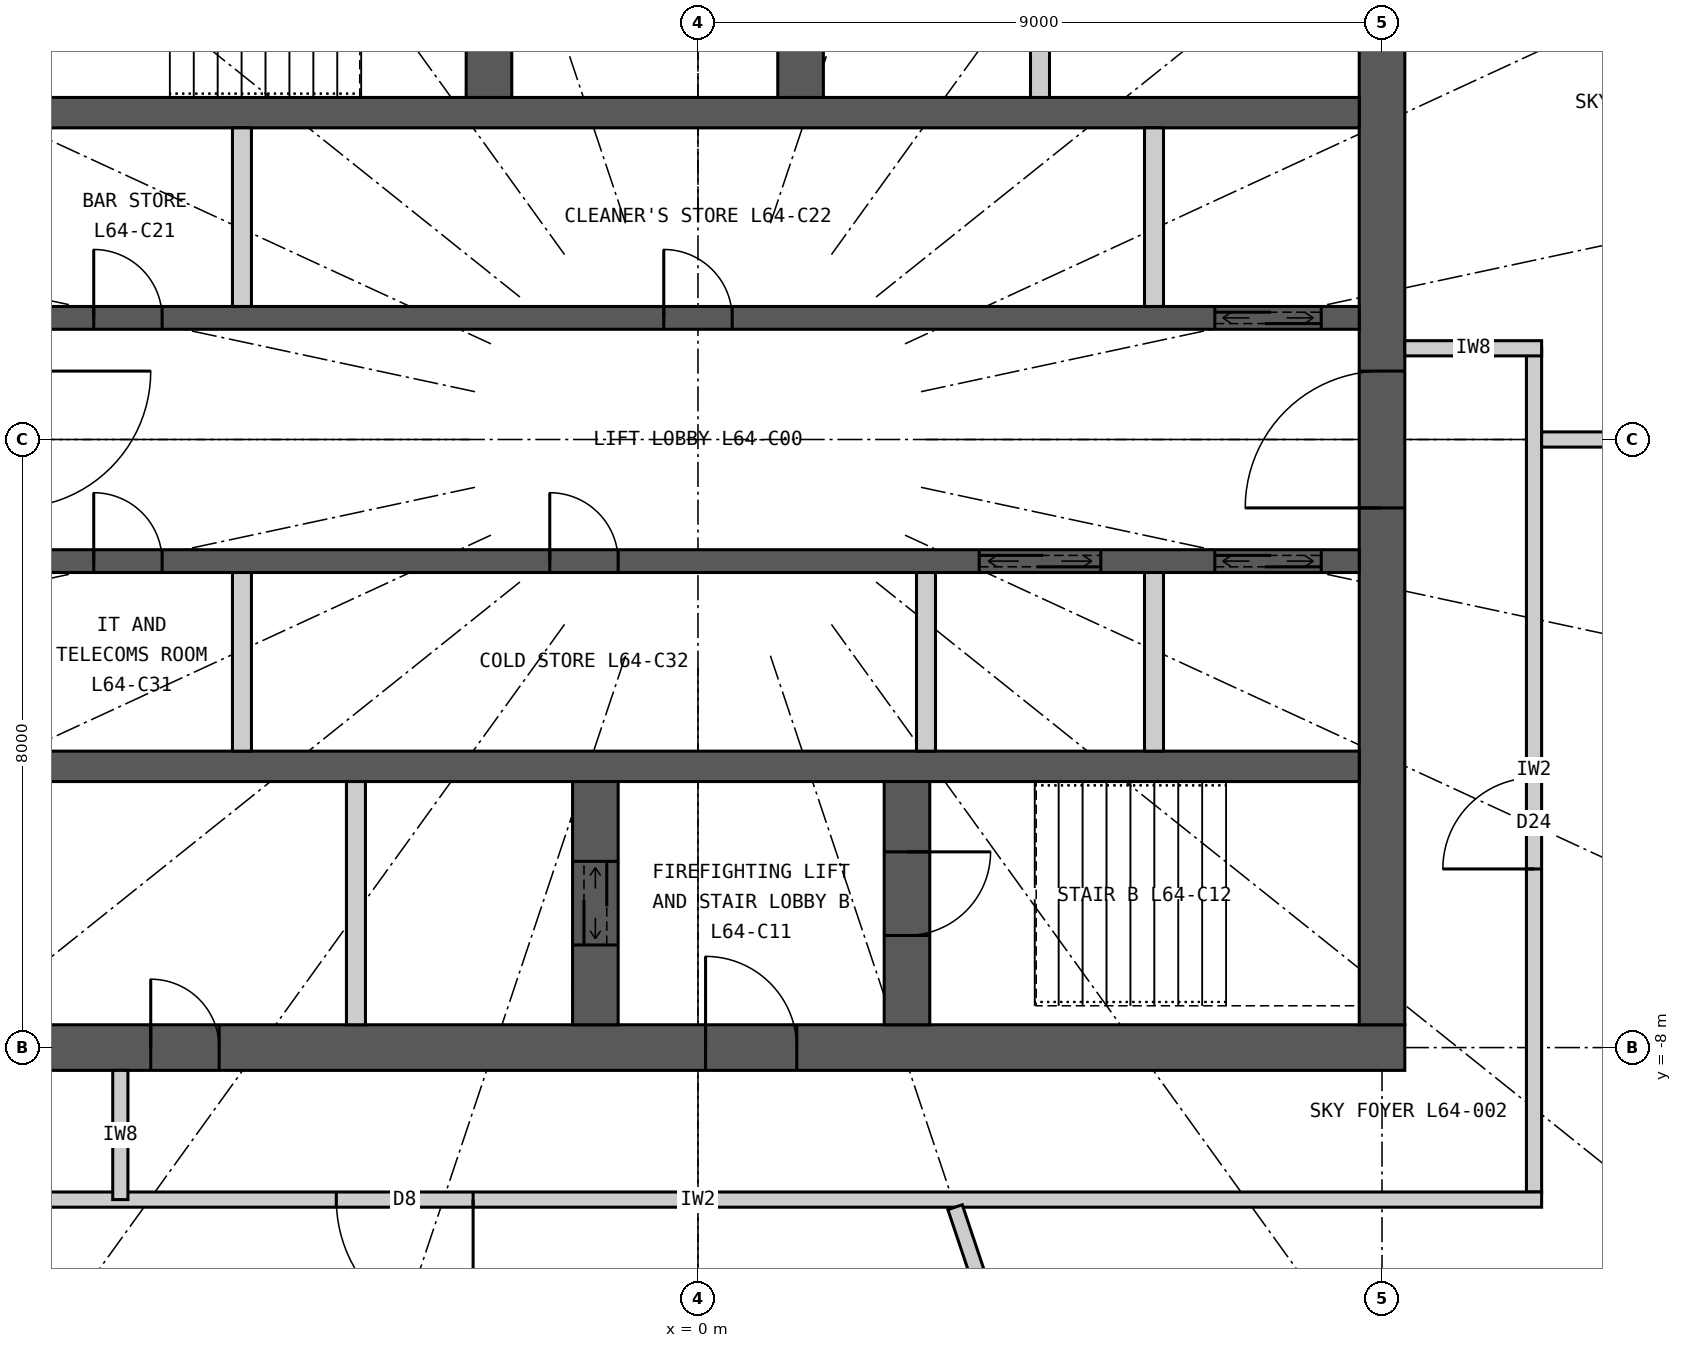
"""IFC4 building model, lengths in metres.
Left out: names, types, materials, properties, quantities, classifications, styles, units other than length and angle.
Written with IfcOpenShell. Run it as: python <this file> out.ifc"""

import sys

from ifc_helpers import new_model, si_unit, direction, frame, frame_2d, origin, place, context, subcontext, project, spatial, rectangle, extrude, element, fill, save


model = new_model("IFC4")
c1 = context("Model", 3, precision=1e-05, world=origin(), true_north=direction((0.0, 1.0)))
c2 = subcontext(c1, "Body", "Model", "MODEL_VIEW")
j1 = project(units=[si_unit("LENGTHUNIT", "METRE"), si_unit("PLANEANGLEUNIT", "RADIAN")], contexts=[c1])
p1 = place(None, origin())
s1 = spatial("IfcSite", under=j1, at=p1, CompositionType="ELEMENT")
p2 = place(p1, origin())
s2 = spatial("IfcBuilding", under=s1, at=p2, CompositionType="ELEMENT")
p3 = place(p2, frame((0.0, 0.0, 237.3)))
s3 = spatial("IfcBuildingStorey", under=s2, at=p3, CompositionType="ELEMENT", Elevation=237.3)
p4 = place(p3, frame((9.3, -8.0, 0.0), z_axis=(0.0, 0.0, 1.0), x_axis=(-1.0, 0.0, 0.0)))
e1 = element("IfcWall", 1, at=p4, inside=s3, PredefinedType="SHEAR", context=c2, shape_type="SweptSolid", body=[
    extrude(rectangle(XDim=18.6, YDim=0.6, at=frame_2d((9.3, 0.0))), origin(), (0.0, 0.0, 1.0), 5.4),
])
p5 = place(p4, frame((8.0, 0.0, 0.0)))
e2 = element("IfcOpeningElement", 2, at=p5, cuts=e1, PredefinedType="OPENING", context=c2, shape_type="SweptSolid", body=[
    extrude(rectangle(XDim=1.2, YDim=2.2, at=frame_2d((0.6, 1.1))), frame((0.0, 0.31, 0.0), z_axis=(0.0, -1.0, 0.0), x_axis=(1.0, 0.0, 0.0)), (0.0, 0.0, 1.0), 0.62),
])
p6 = place(p4, frame((15.6, 0.0, 0.0)))
e3 = element("IfcOpeningElement", 3, at=p6, cuts=e1, PredefinedType="OPENING", context=c2, shape_type="SweptSolid", body=[
    extrude(rectangle(XDim=0.9, YDim=2.2, at=frame_2d((0.45, 1.1))), frame((0.0, 0.31, 0.0), z_axis=(0.0, -1.0, 0.0), x_axis=(1.0, 0.0, 0.0)), (0.0, 0.0, 1.0), 0.62),
])
p7 = place(p3, frame((9.0, -7.7, 0.0), z_axis=(0.0, 0.0, 1.0), x_axis=(0.0, 1.0, 0.0)))
e4 = element("IfcWall", 4, at=p7, inside=s3, PredefinedType="SHEAR", context=c2, shape_type="SweptSolid", body=[
    extrude(rectangle(XDim=15.4, YDim=0.6, at=frame_2d((7.7, 0.0))), origin(), (0.0, 0.0, 1.0), 5.4),
])
p8 = place(p7, frame((6.8, 0.0, 0.0)))
e5 = element("IfcOpeningElement", 5, at=p8, cuts=e4, PredefinedType="OPENING", context=c2, shape_type="SweptSolid", body=[
    extrude(rectangle(XDim=1.8, YDim=2.2, at=frame_2d((0.9, 1.1))), frame((0.0, 0.31, 0.0), z_axis=(0.0, -1.0, 0.0), x_axis=(1.0, 0.0, 0.0)), (0.0, 0.0, 1.0), 0.62),
])
p9 = place(p3, frame((-8.7, 4.3, 0.0), z_axis=(0.0, 0.0, 1.0), x_axis=(1.0, 0.0, 0.0)))
e6 = element("IfcWall", 6, at=p9, inside=s3, PredefinedType="SHEAR", context=c2, shape_type="SweptSolid", body=[
    extrude(rectangle(XDim=17.4, YDim=0.4, at=frame_2d((8.7, 0.0))), origin(), (0.0, 0.0, 1.0), 5.4),
])
p10 = place(p3, frame((-8.7, 1.6, 0.0), z_axis=(0.0, 0.0, 1.0), x_axis=(1.0, 0.0, 0.0)))
e7 = element("IfcWall", 7, at=p10, inside=s3, PredefinedType="SHEAR", context=c2, shape_type="SweptSolid", body=[
    extrude(rectangle(XDim=17.4, YDim=0.3, at=frame_2d((8.7, 0.0))), origin(), (0.0, 0.0, 1.0), 5.4),
])
p11 = place(p10, frame((15.5, 0.0, 0.0)))
e8 = element("IfcOpeningElement", 8, at=p11, cuts=e7, PredefinedType="OPENING", context=c2, shape_type="SweptSolid", body=[
    extrude(rectangle(XDim=1.4, YDim=2.4, at=frame_2d((0.7, 1.2))), frame((0.0, 0.16, 0.0), z_axis=(0.0, -1.0, 0.0), x_axis=(1.0, 0.0, 0.0)), (0.0, 0.0, 1.0), 0.32),
])
p12 = place(p10, frame((0.75, 0.0, 0.0)))
e9 = element("IfcOpeningElement", 9, at=p12, cuts=e7, PredefinedType="OPENING", context=c2, shape_type="SweptSolid", body=[
    extrude(rectangle(XDim=0.9, YDim=2.2, at=frame_2d((0.45, 1.1))), frame((0.0, 0.16, 0.0), z_axis=(0.0, -1.0, 0.0), x_axis=(1.0, 0.0, 0.0)), (0.0, 0.0, 1.0), 0.32),
])
p13 = place(p10, frame((8.25, 0.0, 0.0)))
e10 = element("IfcOpeningElement", 10, at=p13, cuts=e7, PredefinedType="OPENING", context=c2, shape_type="SweptSolid", body=[
    extrude(rectangle(XDim=0.9, YDim=2.2, at=frame_2d((0.45, 1.1))), frame((0.0, 0.16, 0.0), z_axis=(0.0, -1.0, 0.0), x_axis=(1.0, 0.0, 0.0)), (0.0, 0.0, 1.0), 0.32),
])
p14 = place(p3, frame((-8.7, -4.3, 0.0), z_axis=(0.0, 0.0, 1.0), x_axis=(1.0, 0.0, 0.0)))
e11 = element("IfcWall", 11, at=p14, inside=s3, PredefinedType="SHEAR", context=c2, shape_type="SweptSolid", body=[
    extrude(rectangle(XDim=17.4, YDim=0.4, at=frame_2d((8.7, 0.0))), origin(), (0.0, 0.0, 1.0), 5.4),
])
p15 = place(p3, frame((-8.7, -1.6, 0.0), z_axis=(0.0, 0.0, 1.0), x_axis=(1.0, 0.0, 0.0)))
e12 = element("IfcWall", 12, at=p15, inside=s3, PredefinedType="SHEAR", context=c2, shape_type="SweptSolid", body=[
    extrude(rectangle(XDim=17.4, YDim=0.3, at=frame_2d((8.7, 0.0))), origin(), (0.0, 0.0, 1.0), 5.4),
])
p16 = place(p15, frame((12.4, 0.0, 0.0)))
e13 = element("IfcOpeningElement", 13, at=p16, cuts=e12, PredefinedType="OPENING", context=c2, shape_type="SweptSolid", body=[
    extrude(rectangle(XDim=1.6, YDim=2.4, at=frame_2d((0.8, 1.2))), frame((0.0, 0.16, 0.0), z_axis=(0.0, -1.0, 0.0), x_axis=(1.0, 0.0, 0.0)), (0.0, 0.0, 1.0), 0.32),
])
p17 = place(p15, frame((15.5, 0.0, 0.0)))
e14 = element("IfcOpeningElement", 14, at=p17, cuts=e12, PredefinedType="OPENING", context=c2, shape_type="SweptSolid", body=[
    extrude(rectangle(XDim=1.4, YDim=2.4, at=frame_2d((0.7, 1.2))), frame((0.0, 0.16, 0.0), z_axis=(0.0, -1.0, 0.0), x_axis=(1.0, 0.0, 0.0)), (0.0, 0.0, 1.0), 0.32),
])
p18 = place(p15, frame((0.75, 0.0, 0.0)))
e15 = element("IfcOpeningElement", 15, at=p18, cuts=e12, PredefinedType="OPENING", context=c2, shape_type="SweptSolid", body=[
    extrude(rectangle(XDim=0.9, YDim=2.2, at=frame_2d((0.45, 1.1))), frame((0.0, 0.16, 0.0), z_axis=(0.0, -1.0, 0.0), x_axis=(1.0, 0.0, 0.0)), (0.0, 0.0, 1.0), 0.32),
])
p19 = place(p15, frame((6.75, 0.0, 0.0)))
e16 = element("IfcOpeningElement", 16, at=p19, cuts=e12, PredefinedType="OPENING", context=c2, shape_type="SweptSolid", body=[
    extrude(rectangle(XDim=0.9, YDim=2.2, at=frame_2d((0.45, 1.1))), frame((0.0, 0.16, 0.0), z_axis=(0.0, -1.0, 0.0), x_axis=(1.0, 0.0, 0.0)), (0.0, 0.0, 1.0), 0.32),
])
p20 = place(p3, frame((-2.75, 4.5, 0.0), z_axis=(0.0, 0.0, 1.0), x_axis=(0.0, 1.0, 0.0)))
e17 = element("IfcWall", 17, at=p20, inside=s3, PredefinedType="SHEAR", context=c2, shape_type="SweptSolid", body=[
    extrude(rectangle(XDim=3.2, YDim=0.6, at=frame_2d((1.6, 0.0))), origin(), (0.0, 0.0, 1.0), 5.4),
])
p21 = place(p20, frame((0.925, 0.0, 0.0)))
e18 = element("IfcOpeningElement", 18, at=p21, cuts=e17, PredefinedType="OPENING", context=c2, shape_type="SweptSolid", body=[
    extrude(rectangle(XDim=1.1, YDim=2.2, at=frame_2d((0.55, 1.1))), frame((0.0, 0.31, 0.0), z_axis=(0.0, -1.0, 0.0), x_axis=(1.0, 0.0, 0.0)), (0.0, 0.0, 1.0), 0.62),
])
p22 = place(p3, frame((1.35, 4.5, 0.0), z_axis=(0.0, 0.0, 1.0), x_axis=(0.0, 1.0, 0.0)))
e19 = element("IfcWall", 19, at=p22, inside=s3, PredefinedType="SHEAR", context=c2, shape_type="SweptSolid", body=[
    extrude(rectangle(XDim=3.2, YDim=0.6, at=frame_2d((1.6, 0.0))), origin(), (0.0, 0.0, 1.0), 5.4),
])
p23 = place(p22, frame((1.05, 0.0, 0.0)))
e20 = element("IfcOpeningElement", 20, at=p23, cuts=e19, PredefinedType="OPENING", context=c2, shape_type="SweptSolid", body=[
    extrude(rectangle(XDim=1.1, YDim=2.2, at=frame_2d((0.55, 1.1))), frame((0.0, 0.31, 0.0), z_axis=(0.0, -1.0, 0.0), x_axis=(1.0, 0.0, 0.0)), (0.0, 0.0, 1.0), 0.62),
])
p24 = place(p3, frame((4.5, 4.5, 0.0), z_axis=(0.0, 0.0, 1.0), x_axis=(0.0, 1.0, 0.0)))
e21 = element("IfcWall", 21, at=p24, inside=s3, PredefinedType="PARTITIONING", context=c2, shape_type="SweptSolid", body=[
    extrude(rectangle(XDim=3.2, YDim=0.25, at=frame_2d((1.6, 0.0))), origin(), (0.0, 0.0, 1.0), 5.4),
])
p25 = place(p3, frame((2.75, -7.7, 0.0), z_axis=(0.0, 0.0, 1.0), x_axis=(0.0, 1.0, 0.0)))
e22 = element("IfcWall", 22, at=p25, inside=s3, PredefinedType="SHEAR", context=c2, shape_type="SweptSolid", body=[
    extrude(rectangle(XDim=3.2, YDim=0.6, at=frame_2d((1.6, 0.0))), origin(), (0.0, 0.0, 1.0), 5.4),
])
p26 = place(p25, frame((1.175, 0.0, 0.0)))
e23 = element("IfcOpeningElement", 23, at=p26, cuts=e22, PredefinedType="OPENING", context=c2, shape_type="SweptSolid", body=[
    extrude(rectangle(XDim=1.1, YDim=2.2, at=frame_2d((0.55, 1.1))), frame((0.0, 0.31, 0.0), z_axis=(0.0, -1.0, 0.0), x_axis=(1.0, 0.0, 0.0)), (0.0, 0.0, 1.0), 0.62),
])
p27 = place(p3, frame((-1.35, -7.7, 0.0), z_axis=(0.0, 0.0, 1.0), x_axis=(0.0, 1.0, 0.0)))
e24 = element("IfcWall", 24, at=p27, inside=s3, PredefinedType="SHEAR", context=c2, shape_type="SweptSolid", body=[
    extrude(rectangle(XDim=3.2, YDim=0.6, at=frame_2d((1.6, 0.0))), origin(), (0.0, 0.0, 1.0), 5.4),
])
p28 = place(p27, frame((1.05, 0.0, 0.0)))
e25 = element("IfcOpeningElement", 25, at=p28, cuts=e24, PredefinedType="OPENING", context=c2, shape_type="SweptSolid", body=[
    extrude(rectangle(XDim=1.1, YDim=2.2, at=frame_2d((0.55, 1.1))), frame((0.0, 0.31, 0.0), z_axis=(0.0, -1.0, 0.0), x_axis=(1.0, 0.0, 0.0)), (0.0, 0.0, 1.0), 0.62),
])
p29 = place(p3, frame((-4.5, -7.7, 0.0), z_axis=(0.0, 0.0, 1.0), x_axis=(0.0, 1.0, 0.0)))
e26 = element("IfcWall", 26, at=p29, inside=s3, PredefinedType="PARTITIONING", context=c2, shape_type="SweptSolid", body=[
    extrude(rectangle(XDim=3.2, YDim=0.25, at=frame_2d((1.6, 0.0))), origin(), (0.0, 0.0, 1.0), 5.4),
])
for number, where, z_axis, x_axis in (
    (27, (-6.0, 1.75, 0.0), (0.0, 0.0, 1.0), (0.0, 1.0, 0.0)),
    (28, (6.0, 1.75, 0.0), (0.0, 0.0, 1.0), (0.0, 1.0, 0.0)),
    (29, (-6.0, -4.1, 0.0), (0.0, 0.0, 1.0), (0.0, 1.0, 0.0)),
    (30, (3.0, -4.1, 0.0), (0.0, 0.0, 1.0), (0.0, 1.0, 0.0)),
    (31, (6.0, -4.1, 0.0), (0.0, 0.0, 1.0), (0.0, 1.0, 0.0)),
):
    element("IfcWall", number, at=place(p3, frame(where, z_axis=z_axis, x_axis=x_axis)), inside=s3, PredefinedType="PARTITIONING", context=c2, shape_type="SweptSolid", body=[
        extrude(rectangle(XDim=2.35, YDim=0.25, at=frame_2d((1.175, 0.0))), origin(), (0.0, 0.0, 1.0), 5.4),
    ])
p30 = place(p3, frame((9.346, -12.951, 0.0), z_axis=(0.0, 0.0, 1.0), x_axis=(0.858849230109, 0.512228464594, 0.0)))
e32 = element("IfcWall", 32, at=p30, inside=s3, PredefinedType="ELEMENTEDWALL", context=c2, shape_type="SweptSolid", body=[
    extrude(rectangle(XDim=4.564, YDim=0.15, at=frame_2d((2.282, 0.0))), origin(), (0.0, 0.0, 1.0), 5.15),
])
p31 = place(p30, frame((0.782, 0.0, 0.5)))
e33 = element("IfcOpeningElement", 33, at=p31, cuts=e32, PredefinedType="OPENING", context=c2, shape_type="SweptSolid", body=[
    extrude(rectangle(XDim=1.2, YDim=3.6, at=frame_2d((0.6, 1.8))), frame((0.0, 0.085, 0.0), z_axis=(0.0, -1.0, 0.0), x_axis=(1.0, 0.0, 0.0)), (0.0, 0.0, 1.0), 0.17),
])
p32 = place(p30, frame((2.582, 0.0, 0.5)))
e34 = element("IfcOpeningElement", 34, at=p32, cuts=e32, PredefinedType="OPENING", context=c2, shape_type="SweptSolid", body=[
    extrude(rectangle(XDim=1.2, YDim=3.6, at=frame_2d((0.6, 1.8))), frame((0.0, 0.085, 0.0), z_axis=(0.0, -1.0, 0.0), x_axis=(1.0, 0.0, 0.0)), (0.0, 0.0, 1.0), 0.17),
])
p33 = place(p3, frame((11.0, -9.9, 0.0), z_axis=(0.0, 0.0, 1.0), x_axis=(0.0, 1.0, 0.0)))
e35 = element("IfcWall", 35, at=p33, inside=s3, PredefinedType="PARTITIONING", context=c2, shape_type="SweptSolid", body=[
    extrude(rectangle(XDim=11.1, YDim=0.2, at=frame_2d((5.55, 0.0))), origin(), (0.0, 0.0, 1.0), 5.15),
])
p34 = place(p33, frame((4.25, 0.0, 0.0)))
e36 = element("IfcOpeningElement", 36, at=p34, cuts=e35, PredefinedType="OPENING", context=c2, shape_type="SweptSolid", body=[
    extrude(rectangle(XDim=1.2, YDim=2.2, at=frame_2d((0.6, 1.1))), frame((0.0, 0.11, 0.0), z_axis=(0.0, -1.0, 0.0), x_axis=(1.0, 0.0, 0.0)), (0.0, 0.0, 1.0), 0.22),
])
p35 = place(p3, frame((11.1, -10.0, 0.0), z_axis=(0.0, 0.0, 1.0), x_axis=(-1.0, 0.0, 0.0)))
e37 = element("IfcWall", 37, at=p35, inside=s3, PredefinedType="PARTITIONING", context=c2, shape_type="SweptSolid", body=[
    extrude(rectangle(XDim=22.2, YDim=0.2, at=frame_2d((11.1, 0.0))), origin(), (0.0, 0.0, 1.0), 5.15),
])
p36 = place(p35, frame((14.059, 0.0, 0.0)))
e38 = element("IfcOpeningElement", 38, at=p36, cuts=e37, PredefinedType="OPENING", context=c2, shape_type="SweptSolid", body=[
    extrude(rectangle(XDim=1.8, YDim=2.4, at=frame_2d((0.9, 1.2))), frame((0.0, 0.11, 0.0), z_axis=(0.0, -1.0, 0.0), x_axis=(1.0, 0.0, 0.0)), (0.0, 0.0, 1.0), 0.22),
])
p37 = place(p3, frame((11.1, 0.0, 0.0), z_axis=(0.0, 0.0, 1.0), x_axis=(1.0, 0.0, 0.0)))
e39 = element("IfcWall", 39, at=p37, inside=s3, PredefinedType="PARTITIONING", context=c2, shape_type="SweptSolid", body=[
    extrude(rectangle(XDim=6.9, YDim=0.2, at=frame_2d((3.45, 0.0))), origin(), (0.0, 0.0, 1.0), 4.3),
])
p38 = place(p3, frame((3.383, -10.1, 0.0), z_axis=(0.0, 0.0, 1.0), x_axis=(0.317596328658, -0.948226013155, 0.0)))
e40 = element("IfcWall", 40, at=p38, inside=s3, PredefinedType="PARTITIONING", context=c2, shape_type="SweptSolid", body=[
    extrude(rectangle(XDim=3.638, YDim=0.2, at=frame_2d((1.819, 0.0))), origin(), (0.0, 0.0, 1.0), 4.3),
])
p39 = place(p3, frame((9.3, 1.2, 0.0), z_axis=(0.0, 0.0, 1.0), x_axis=(1.0, 0.0, 0.0)))
e41 = element("IfcWall", 41, at=p39, inside=s3, PredefinedType="PARTITIONING", context=c2, shape_type="SweptSolid", body=[
    extrude(rectangle(XDim=1.8, YDim=0.2, at=frame_2d((0.9, 0.0))), origin(), (0.0, 0.0, 1.0), 5.15),
])
p40 = place(p3, frame((-7.6, -8.3, 0.0), z_axis=(0.0, 0.0, 1.0), x_axis=(0.0, -1.0, 0.0)))
e42 = element("IfcWall", 42, at=p40, inside=s3, PredefinedType="PARTITIONING", context=c2, shape_type="SweptSolid", body=[
    extrude(rectangle(XDim=1.7, YDim=0.2, at=frame_2d((0.85, 0.0))), origin(), (0.0, 0.0, 1.0), 5.15),
])
p41 = place(p34, origin())
e43 = element("IfcDoor", 43, at=p41, inside=s3, OperationType="SINGLE_SWING_LEFT", PredefinedType="DOOR", context=c2, shape_type="SweptSolid", body=[
    extrude(rectangle(XDim=1.2, YDim=2.2, at=frame_2d((0.6, 1.1))), frame((0.0, 0.025, 0.0), z_axis=(0.0, -1.0, 0.0), x_axis=(1.0, 0.0, 0.0)), (0.0, 0.0, 1.0), 0.05),
])
fill(e36, e43)
p42 = place(p36, origin())
e44 = element("IfcDoor", 44, at=p42, inside=s3, OperationType="DOUBLE_DOOR_DOUBLE_SWING", PredefinedType="DOOR", context=c2, shape_type="SweptSolid", body=[
    extrude(rectangle(XDim=1.8, YDim=2.4, at=frame_2d((0.9, 1.2))), frame((0.0, 0.025, 0.0), z_axis=(0.0, -1.0, 0.0), x_axis=(1.0, 0.0, 0.0)), (0.0, 0.0, 1.0), 0.05),
])
fill(e38, e44)
p43 = place(p5, origin())
e45 = element("IfcDoor", 45, at=p43, inside=s3, OperationType="SINGLE_SWING_RIGHT", PredefinedType="DOOR", context=c2, shape_type="SweptSolid", body=[
    extrude(rectangle(XDim=1.2, YDim=2.2, at=frame_2d((0.6, 1.1))), frame((0.0, 0.025, 0.0), z_axis=(0.0, -1.0, 0.0), x_axis=(1.0, 0.0, 0.0)), (0.0, 0.0, 1.0), 0.05),
])
fill(e2, e45)
p44 = place(p26, origin())
e46 = element("IfcDoor", 46, at=p44, inside=s3, OperationType="SINGLE_SWING_RIGHT", PredefinedType="DOOR", context=c2, shape_type="SweptSolid", body=[
    extrude(rectangle(XDim=1.1, YDim=2.2, at=frame_2d((0.55, 1.1))), frame((0.0, 0.025, 0.0), z_axis=(0.0, -1.0, 0.0), x_axis=(1.0, 0.0, 0.0)), (0.0, 0.0, 1.0), 0.05),
])
fill(e23, e46)
p45 = place(p28, origin())
e47 = element("IfcDoor", 47, at=p45, inside=s3, OperationType="DOUBLE_DOOR_SLIDING", PredefinedType="DOOR", context=c2, shape_type="SweptSolid", body=[
    extrude(rectangle(XDim=1.1, YDim=2.2, at=frame_2d((0.55, 1.1))), frame((0.0, 0.025, 0.0), z_axis=(0.0, -1.0, 0.0), x_axis=(1.0, 0.0, 0.0)), (0.0, 0.0, 1.0), 0.05),
])
fill(e25, e47)
p46 = place(p6, origin())
e48 = element("IfcDoor", 48, at=p46, inside=s3, OperationType="SINGLE_SWING_RIGHT", PredefinedType="DOOR", context=c2, shape_type="SweptSolid", body=[
    extrude(rectangle(XDim=0.9, YDim=2.2, at=frame_2d((0.45, 1.1))), frame((0.0, 0.025, 0.0), z_axis=(0.0, -1.0, 0.0), x_axis=(1.0, 0.0, 0.0)), (0.0, 0.0, 1.0), 0.05),
])
fill(e3, e48)
p47 = place(p11, origin())
e49 = element("IfcDoor", 49, at=p47, inside=s3, OperationType="DOUBLE_DOOR_SLIDING", PredefinedType="DOOR", context=c2, shape_type="SweptSolid", body=[
    extrude(rectangle(XDim=1.4, YDim=2.4, at=frame_2d((0.7, 1.2))), frame((0.0, 0.025, 0.0), z_axis=(0.0, -1.0, 0.0), x_axis=(1.0, 0.0, 0.0)), (0.0, 0.0, 1.0), 0.05),
])
fill(e8, e49)
p48 = place(p16, origin())
e50 = element("IfcDoor", 50, at=p48, inside=s3, OperationType="DOUBLE_DOOR_SLIDING", PredefinedType="DOOR", context=c2, shape_type="SweptSolid", body=[
    extrude(rectangle(XDim=1.6, YDim=2.4, at=frame_2d((0.8, 1.2))), frame((0.0, 0.025, 0.0), z_axis=(0.0, -1.0, 0.0), x_axis=(1.0, 0.0, 0.0)), (0.0, 0.0, 1.0), 0.05),
])
fill(e13, e50)
p49 = place(p17, origin())
e51 = element("IfcDoor", 51, at=p49, inside=s3, OperationType="DOUBLE_DOOR_SLIDING", PredefinedType="DOOR", context=c2, shape_type="SweptSolid", body=[
    extrude(rectangle(XDim=1.4, YDim=2.4, at=frame_2d((0.7, 1.2))), frame((0.0, 0.025, 0.0), z_axis=(0.0, -1.0, 0.0), x_axis=(1.0, 0.0, 0.0)), (0.0, 0.0, 1.0), 0.05),
])
fill(e14, e51)
p50 = place(p12, origin())
e52 = element("IfcDoor", 52, at=p50, inside=s3, OperationType="SINGLE_SWING_LEFT", PredefinedType="DOOR", context=c2, shape_type="SweptSolid", body=[
    extrude(rectangle(XDim=0.9, YDim=2.2, at=frame_2d((0.45, 1.1))), frame((0.0, 0.025, 0.0), z_axis=(0.0, -1.0, 0.0), x_axis=(1.0, 0.0, 0.0)), (0.0, 0.0, 1.0), 0.05),
])
fill(e9, e52)
p51 = place(p13, origin())
e53 = element("IfcDoor", 53, at=p51, inside=s3, OperationType="SINGLE_SWING_LEFT", PredefinedType="DOOR", context=c2, shape_type="SweptSolid", body=[
    extrude(rectangle(XDim=0.9, YDim=2.2, at=frame_2d((0.45, 1.1))), frame((0.0, 0.025, 0.0), z_axis=(0.0, -1.0, 0.0), x_axis=(1.0, 0.0, 0.0)), (0.0, 0.0, 1.0), 0.05),
])
fill(e10, e53)
p52 = place(p18, origin())
e54 = element("IfcDoor", 54, at=p52, inside=s3, OperationType="SINGLE_SWING_LEFT", PredefinedType="DOOR", context=c2, shape_type="SweptSolid", body=[
    extrude(rectangle(XDim=0.9, YDim=2.2, at=frame_2d((0.45, 1.1))), frame((0.0, 0.025, 0.0), z_axis=(0.0, -1.0, 0.0), x_axis=(1.0, 0.0, 0.0)), (0.0, 0.0, 1.0), 0.05),
])
fill(e15, e54)
p53 = place(p19, origin())
e55 = element("IfcDoor", 55, at=p53, inside=s3, OperationType="SINGLE_SWING_LEFT", PredefinedType="DOOR", context=c2, shape_type="SweptSolid", body=[
    extrude(rectangle(XDim=0.9, YDim=2.2, at=frame_2d((0.45, 1.1))), frame((0.0, 0.025, 0.0), z_axis=(0.0, -1.0, 0.0), x_axis=(1.0, 0.0, 0.0)), (0.0, 0.0, 1.0), 0.05),
])
fill(e16, e55)
p54 = place(p8, origin())
e56 = element("IfcDoor", 56, at=p54, inside=s3, OperationType="DOUBLE_DOOR_DOUBLE_SWING", PredefinedType="DOOR", context=c2, shape_type="SweptSolid", body=[
    extrude(rectangle(XDim=1.8, YDim=2.2, at=frame_2d((0.9, 1.1))), frame((0.0, 0.025, 0.0), z_axis=(0.0, -1.0, 0.0), x_axis=(1.0, 0.0, 0.0)), (0.0, 0.0, 1.0), 0.05),
])
fill(e5, e56)
save(model, sys.argv[1])
